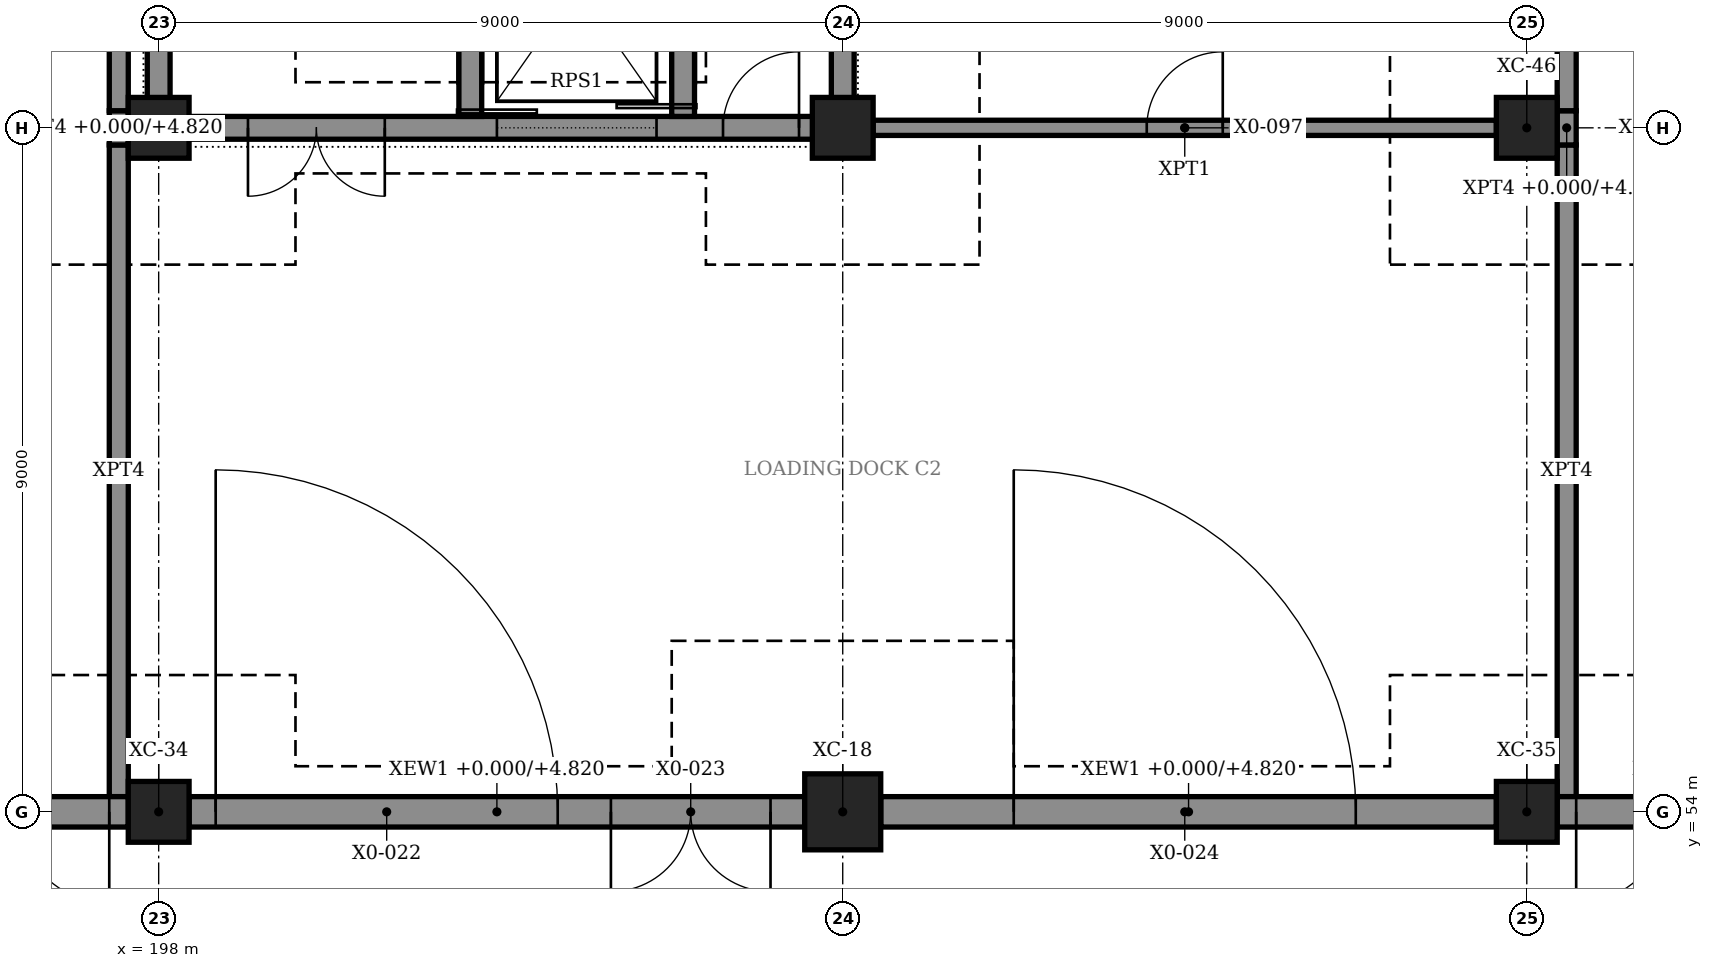
"""IFC4 building model, lengths in metres.
Left out: names, types, materials, properties, quantities, classifications, styles, units other than length and angle.
Written with IfcOpenShell. Run it as: python <this file> out.ifc"""

import sys

from ifc_helpers import new_model, si_unit, direction, frame, frame_2d, origin, origin_2d, place, context, subcontext, project, spatial, rectangle, hollow_rectangle, extrude, element, fill, save


model = new_model("IFC4")
c1 = context("Model", 3, precision=1e-05, world=origin(), true_north=direction((0.0, 1.0)))
c2 = subcontext(c1, "Body", "Model", "MODEL_VIEW")
j1 = project(units=[si_unit("LENGTHUNIT", "METRE"), si_unit("PLANEANGLEUNIT", "RADIAN")], contexts=[c1])
p1 = place(None, origin())
s1 = spatial("IfcSite", under=j1, at=p1, CompositionType="ELEMENT")
p2 = place(p1, origin())
s2 = spatial("IfcBuilding", under=s1, at=p2, CompositionType="ELEMENT")
p3 = place(p2, origin())
s3 = spatial("IfcBuildingStorey", under=s2, at=p3, CompositionType="ELEMENT", Elevation=0.0)
p4 = place(p3, frame((207.0, 54.0, 0.0), z_axis=(0.0, 0.0, 1.0), x_axis=(1.0, 0.0, 0.0)))
e1 = element("IfcColumn", 1, at=p4, inside=s3, PredefinedType="COLUMN", context=c2, shape_type="SweptSolid", body=[
    extrude(hollow_rectangle(XDim=1.0, YDim=1.0, WallThickness=0.032, at=origin_2d()), origin(), (0.0, 0.0, 1.0), 6.0),
])
for number, where, z_axis, x_axis in (
    (2, (198.0, 54.0, 0.0), (0.0, 0.0, 1.0), (1.0, 0.0, 0.0)),
    (3, (216.0, 54.0, 0.0), (0.0, 0.0, 1.0), (1.0, 0.0, 0.0)),
    (4, (198.0, 63.0, 0.0), (0.0, 0.0, 1.0), (1.0, 0.0, 0.0)),
    (5, (207.0, 63.0, 0.0), (0.0, 0.0, 1.0), (1.0, 0.0, 0.0)),
    (6, (216.0, 63.0, 0.0), (0.0, 0.0, 1.0), (1.0, 0.0, 0.0)),
):
    element("IfcColumn", number, at=place(p3, frame(where, z_axis=z_axis, x_axis=x_axis)), inside=s3, PredefinedType="COLUMN", context=c2, shape_type="SweptSolid", body=[
        extrude(rectangle(XDim=0.8, YDim=0.8, at=origin_2d()), origin(), (0.0, 0.0, 1.0), 6.0),
    ])
p5 = place(p3, frame((197.85, 63.0, 0.0), z_axis=(0.0, 0.0, 1.0), x_axis=(1.0, 0.0, 0.0)))
e7 = element("IfcWall", 7, at=p5, inside=s3, PredefinedType="SHEAR", context=c2, shape_type="SweptSolid", body=[
    extrude(rectangle(XDim=9.3, YDim=0.3, at=frame_2d((4.65, 0.0))), origin(), (0.0, 0.0, 1.0), 6.0),
])
p6 = place(p5, frame((1.325, 0.0, 0.0)))
e8 = element("IfcOpeningElement", 8, at=p6, cuts=e7, PredefinedType="OPENING", context=c2, shape_type="SweptSolid", body=[
    extrude(rectangle(XDim=1.8, YDim=2.4, at=frame_2d((0.9, 1.2))), frame((0.0, 0.16, 0.0), z_axis=(0.0, -1.0, 0.0), x_axis=(1.0, 0.0, 0.0)), (0.0, 0.0, 1.0), 0.32),
])
p7 = place(p5, frame((4.6, 0.0, 0.0)))
e9 = element("IfcOpeningElement", 9, at=p7, cuts=e7, PredefinedType="OPENING", context=c2, shape_type="SweptSolid", body=[
    extrude(rectangle(XDim=2.1, YDim=2.4, at=frame_2d((1.05, 1.2))), frame((0.0, 0.16, 0.0), z_axis=(0.0, -1.0, 0.0), x_axis=(1.0, 0.0, 0.0)), (0.0, 0.0, 1.0), 0.32),
])
p8 = place(p5, frame((7.575, 0.0, 0.0)))
e10 = element("IfcOpeningElement", 10, at=p8, cuts=e7, PredefinedType="OPENING", context=c2, shape_type="SweptSolid", body=[
    extrude(rectangle(XDim=1.0, YDim=2.4, at=frame_2d((0.5, 1.2))), frame((0.0, 0.16, 0.0), z_axis=(0.0, -1.0, 0.0), x_axis=(1.0, 0.0, 0.0)), (0.0, 0.0, 1.0), 0.32),
])
for number, where, z_axis, x_axis in (
    (11, (198.0, 63.15, 0.0), (0.0, 0.0, 1.0), (0.0, 1.0, 0.0)),
    (12, (207.0, 63.15, 0.0), (0.0, 0.0, 1.0), (0.0, 1.0, 0.0)),
):
    element("IfcWall", number, at=place(p3, frame(where, z_axis=z_axis, x_axis=x_axis)), inside=s3, PredefinedType="SHEAR", context=c2, shape_type="SweptSolid", body=[
        extrude(rectangle(XDim=8.65, YDim=0.3, at=frame_2d((4.325, 0.0))), origin(), (0.0, 0.0, 1.0), 6.0),
    ])
p9 = place(p3, frame((189.5, 54.0, 0.0), z_axis=(0.0, 0.0, 1.0), x_axis=(1.0, 0.0, 0.0)))
e13 = element("IfcWall", 13, at=p9, inside=s3, PredefinedType="SOLIDWALL", context=c2, shape_type="SweptSolid", body=[
    extrude(rectangle(XDim=8.1, YDim=0.4, at=frame_2d((4.05, 0.0))), origin(), (0.0, 0.0, 1.0), 4.82),
])
p10 = place(p9, frame((0.25, 0.0, 0.0)))
e14 = element("IfcOpeningElement", 14, at=p10, cuts=e13, PredefinedType="OPENING", context=c2, shape_type="SweptSolid", body=[
    extrude(rectangle(XDim=4.5, YDim=4.5, at=frame_2d((2.25, 2.25))), frame((0.0, 0.21, 0.0), z_axis=(0.0, -1.0, 0.0), x_axis=(1.0, 0.0, 0.0)), (0.0, 0.0, 1.0), 0.42),
])
p11 = place(p9, frame((5.45, 0.0, 0.0)))
e15 = element("IfcOpeningElement", 15, at=p11, cuts=e13, PredefinedType="OPENING", context=c2, shape_type="SweptSolid", body=[
    extrude(rectangle(XDim=2.4, YDim=2.4, at=frame_2d((1.2, 1.2))), frame((0.0, 0.21, 0.0), z_axis=(0.0, -1.0, 0.0), x_axis=(1.0, 0.0, 0.0)), (0.0, 0.0, 1.0), 0.42),
])
p12 = place(p3, frame((198.4, 54.0, 0.0), z_axis=(0.0, 0.0, 1.0), x_axis=(1.0, 0.0, 0.0)))
e16 = element("IfcWall", 16, at=p12, inside=s3, PredefinedType="SOLIDWALL", context=c2, shape_type="SweptSolid", body=[
    extrude(rectangle(XDim=8.1, YDim=0.4, at=frame_2d((4.05, 0.0))), origin(), (0.0, 0.0, 1.0), 4.82),
])
p13 = place(p12, frame((0.35, 0.0, 0.0)))
e17 = element("IfcOpeningElement", 17, at=p13, cuts=e16, PredefinedType="OPENING", context=c2, shape_type="SweptSolid", body=[
    extrude(rectangle(XDim=4.5, YDim=4.5, at=frame_2d((2.25, 2.25))), frame((0.0, 0.21, 0.0), z_axis=(0.0, -1.0, 0.0), x_axis=(1.0, 0.0, 0.0)), (0.0, 0.0, 1.0), 0.42),
])
p14 = place(p12, frame((5.55, 0.0, 0.0)))
e18 = element("IfcOpeningElement", 18, at=p14, cuts=e16, PredefinedType="OPENING", context=c2, shape_type="SweptSolid", body=[
    extrude(rectangle(XDim=2.1, YDim=2.4, at=frame_2d((1.05, 1.2))), frame((0.0, 0.21, 0.0), z_axis=(0.0, -1.0, 0.0), x_axis=(1.0, 0.0, 0.0)), (0.0, 0.0, 1.0), 0.42),
])
p15 = place(p3, frame((207.5, 54.0, 0.0), z_axis=(0.0, 0.0, 1.0), x_axis=(1.0, 0.0, 0.0)))
e19 = element("IfcWall", 19, at=p15, inside=s3, PredefinedType="SOLIDWALL", context=c2, shape_type="SweptSolid", body=[
    extrude(rectangle(XDim=8.1, YDim=0.4, at=frame_2d((4.05, 0.0))), origin(), (0.0, 0.0, 1.0), 4.82),
])
p16 = place(p15, frame((1.75, 0.0, 0.0)))
e20 = element("IfcOpeningElement", 20, at=p16, cuts=e19, PredefinedType="OPENING", context=c2, shape_type="SweptSolid", body=[
    extrude(rectangle(XDim=4.5, YDim=4.5, at=frame_2d((2.25, 2.25))), frame((0.0, 0.21, 0.0), z_axis=(0.0, -1.0, 0.0), x_axis=(1.0, 0.0, 0.0)), (0.0, 0.0, 1.0), 0.42),
])
p17 = place(p3, frame((216.4, 54.0, 0.0), z_axis=(0.0, 0.0, 1.0), x_axis=(1.0, 0.0, 0.0)))
e21 = element("IfcWall", 21, at=p17, inside=s3, PredefinedType="SOLIDWALL", context=c2, shape_type="SweptSolid", body=[
    extrude(rectangle(XDim=8.1, YDim=0.4, at=frame_2d((4.05, 0.0))), origin(), (0.0, 0.0, 1.0), 4.82),
])
p18 = place(p17, frame((3.35, 0.0, 0.0)))
e22 = element("IfcOpeningElement", 22, at=p18, cuts=e21, PredefinedType="OPENING", context=c2, shape_type="SweptSolid", body=[
    extrude(rectangle(XDim=4.5, YDim=4.5, at=frame_2d((2.25, 2.25))), frame((0.0, 0.21, 0.0), z_axis=(0.0, -1.0, 0.0), x_axis=(1.0, 0.0, 0.0)), (0.0, 0.0, 1.0), 0.42),
])
p19 = place(p17, frame((0.25, 0.0, 0.0)))
e23 = element("IfcOpeningElement", 23, at=p19, cuts=e21, PredefinedType="OPENING", context=c2, shape_type="SweptSolid", body=[
    extrude(rectangle(XDim=2.4, YDim=2.4, at=frame_2d((1.2, 1.2))), frame((0.0, 0.21, 0.0), z_axis=(0.0, -1.0, 0.0), x_axis=(1.0, 0.0, 0.0)), (0.0, 0.0, 1.0), 0.42),
])
p20 = place(p3, frame((202.1, 63.15, 0.0), z_axis=(0.0, 0.0, 1.0), x_axis=(0.0, 1.0, 0.0)))
e24 = element("IfcWall", 24, at=p20, inside=s3, PredefinedType="SHEAR", context=c2, shape_type="SweptSolid", body=[
    extrude(rectangle(XDim=8.65, YDim=0.3, at=frame_2d((4.325, 0.0))), origin(), (0.0, 0.0, 1.0), 5.72),
])
p21 = place(p3, frame((204.9, 63.15, 0.0), z_axis=(0.0, 0.0, 1.0), x_axis=(0.0, 1.0, 0.0)))
e25 = element("IfcWall", 25, at=p21, inside=s3, PredefinedType="SHEAR", context=c2, shape_type="SweptSolid", body=[
    extrude(rectangle(XDim=3.7, YDim=0.3, at=frame_2d((1.85, 0.0))), origin(), (0.0, 0.0, 1.0), 5.72),
])
for number, where, z_axis, x_axis in (
    (26, (202.1, 63.6, -1.4), (0.0, 0.0, 1.0), (0.0, 1.0, 0.0)),
    (27, (204.9, 63.6, -1.4), (0.0, 0.0, 1.0), (0.0, 1.0, 0.0)),
):
    element("IfcWall", number, at=place(p3, frame(where, z_axis=z_axis, x_axis=x_axis)), inside=s3, PredefinedType="SHEAR", context=c2, shape_type="SweptSolid", body=[
        extrude(rectangle(XDim=3.25, YDim=0.3, at=frame_2d((1.625, 0.0))), origin(), (0.0, 0.0, 1.0), 1.4),
    ])
p22 = place(p3, frame((207.4, 63.0, 0.0), z_axis=(0.0, 0.0, 1.0), x_axis=(1.0, 0.0, 0.0)))
e28 = element("IfcWall", 28, at=p22, inside=s3, PredefinedType="PARTITIONING", context=c2, shape_type="SweptSolid", body=[
    extrude(rectangle(XDim=8.2, YDim=0.2, at=frame_2d((4.1, 0.0))), origin(), (0.0, 0.0, 1.0), 4.82),
])
p23 = place(p22, frame((3.6, 0.0, 0.015)))
e29 = element("IfcOpeningElement", 29, at=p23, cuts=e28, PredefinedType="OPENING", context=c2, shape_type="SweptSolid", body=[
    extrude(rectangle(XDim=1.0, YDim=2.4, at=frame_2d((0.5, 1.2))), frame((0.0, 0.11, 0.0), z_axis=(0.0, -1.0, 0.0), x_axis=(1.0, 0.0, 0.0)), (0.0, 0.0, 1.0), 0.22),
])
p24 = place(p3, frame((197.475, 54.2, 0.0), z_axis=(0.0, 0.0, 1.0), x_axis=(0.0, 1.0, 0.0)))
e30 = element("IfcWall", 30, at=p24, inside=s3, PredefinedType="PARTITIONING", context=c2, shape_type="SweptSolid", body=[
    extrude(rectangle(XDim=8.575, YDim=0.25, at=frame_2d((4.288, 0.0))), origin(), (0.0, 0.0, 1.0), 5.72),
])
p25 = place(p3, frame((197.475, 62.775, 0.0), z_axis=(0.0, 0.0, 1.0), x_axis=(0.0, 1.0, 0.0)))
e31 = element("IfcWall", 31, at=p25, inside=s3, PredefinedType="PARTITIONING", context=c2, shape_type="SweptSolid", body=[
    extrude(rectangle(XDim=0.45, YDim=0.25, at=frame_2d((0.225, 0.0))), origin(), (0.0, 0.0, 1.0), 4.82),
])
for number, where, z_axis, x_axis in (
    (32, (197.475, 63.225, 0.0), (0.0, 0.0, 1.0), (0.0, 1.0, 0.0)),
    (33, (216.525, 54.2, 0.0), (0.0, 0.0, 1.0), (0.0, 1.0, 0.0)),
):
    element("IfcWall", number, at=place(p3, frame(where, z_axis=z_axis, x_axis=x_axis)), inside=s3, PredefinedType="PARTITIONING", context=c2, shape_type="SweptSolid", body=[
        extrude(rectangle(XDim=8.575, YDim=0.25, at=frame_2d((4.288, 0.0))), origin(), (0.0, 0.0, 1.0), 5.72),
    ])
p26 = place(p3, frame((216.525, 62.775, 0.0), z_axis=(0.0, 0.0, 1.0), x_axis=(0.0, 1.0, 0.0)))
e34 = element("IfcWall", 34, at=p26, inside=s3, PredefinedType="PARTITIONING", context=c2, shape_type="SweptSolid", body=[
    extrude(rectangle(XDim=0.45, YDim=0.25, at=frame_2d((0.225, 0.0))), origin(), (0.0, 0.0, 1.0), 4.82),
])
p27 = place(p3, frame((216.525, 63.225, 0.0), z_axis=(0.0, 0.0, 1.0), x_axis=(0.0, 1.0, 0.0)))
e35 = element("IfcWall", 35, at=p27, inside=s3, PredefinedType="PARTITIONING", context=c2, shape_type="SweptSolid", body=[
    extrude(rectangle(XDim=8.575, YDim=0.25, at=frame_2d((4.288, 0.0))), origin(), (0.0, 0.0, 1.0), 5.72),
])
p28 = place(p13, origin())
e36 = element("IfcDoor", 36, at=p28, inside=s3, OperationType="ROLLINGUP", PredefinedType="DOOR", context=c2, shape_type="SweptSolid", body=[
    extrude(rectangle(XDim=4.5, YDim=4.5, at=frame_2d((2.25, 2.25))), frame((0.0, 0.025, 0.0), z_axis=(0.0, -1.0, 0.0), x_axis=(1.0, 0.0, 0.0)), (0.0, 0.0, 1.0), 0.05),
])
fill(e17, e36)
p29 = place(p14, frame((2.1, 0.0, 0.0), z_axis=(0.0, 0.0, 1.0), x_axis=(-1.0, 0.0, 0.0)))
e37 = element("IfcDoor", 37, at=p29, inside=s3, OperationType="DOUBLE_DOOR_SINGLE_SWING", PredefinedType="DOOR", context=c2, shape_type="SweptSolid", body=[
    extrude(rectangle(XDim=2.1, YDim=2.4, at=frame_2d((1.05, 1.2))), frame((0.0, 0.025, 0.0), z_axis=(0.0, -1.0, 0.0), x_axis=(1.0, 0.0, 0.0)), (0.0, 0.0, 1.0), 0.05),
])
fill(e18, e37)
p30 = place(p16, origin())
e38 = element("IfcDoor", 38, at=p30, inside=s3, OperationType="ROLLINGUP", PredefinedType="DOOR", context=c2, shape_type="SweptSolid", body=[
    extrude(rectangle(XDim=4.5, YDim=4.5, at=frame_2d((2.25, 2.25))), frame((0.0, 0.025, 0.0), z_axis=(0.0, -1.0, 0.0), x_axis=(1.0, 0.0, 0.0)), (0.0, 0.0, 1.0), 0.05),
])
fill(e20, e38)
p31 = place(p11, frame((2.4, 0.0, 0.0), z_axis=(0.0, 0.0, 1.0), x_axis=(-1.0, 0.0, 0.0)))
e39 = element("IfcDoor", 39, at=p31, inside=s3, OperationType="DOUBLE_DOOR_SINGLE_SWING", PredefinedType="DOOR", context=c2, shape_type="SweptSolid", body=[
    extrude(rectangle(XDim=2.4, YDim=2.4, at=frame_2d((1.2, 1.2))), frame((0.0, 0.025, 0.0), z_axis=(0.0, -1.0, 0.0), x_axis=(1.0, 0.0, 0.0)), (0.0, 0.0, 1.0), 0.05),
])
fill(e15, e39)
p32 = place(p19, frame((2.4, 0.0, 0.0), z_axis=(0.0, 0.0, 1.0), x_axis=(-1.0, 0.0, 0.0)))
e40 = element("IfcDoor", 40, at=p32, inside=s3, OperationType="DOUBLE_DOOR_SINGLE_SWING", PredefinedType="DOOR", context=c2, shape_type="SweptSolid", body=[
    extrude(rectangle(XDim=2.4, YDim=2.4, at=frame_2d((1.2, 1.2))), frame((0.0, 0.025, 0.0), z_axis=(0.0, -1.0, 0.0), x_axis=(1.0, 0.0, 0.0)), (0.0, 0.0, 1.0), 0.05),
])
fill(e23, e40)
p33 = place(p23, origin())
e41 = element("IfcDoor", 41, at=p33, inside=s3, OperationType="SINGLE_SWING_RIGHT", PredefinedType="DOOR", context=c2, shape_type="SweptSolid", body=[
    extrude(rectangle(XDim=1.0, YDim=2.4, at=frame_2d((0.5, 1.2))), frame((0.0, 0.025, 0.0), z_axis=(0.0, -1.0, 0.0), x_axis=(1.0, 0.0, 0.0)), (0.0, 0.0, 1.0), 0.05),
])
fill(e29, e41)
p34 = place(p6, frame((1.8, 0.0, 0.0), z_axis=(0.0, 0.0, 1.0), x_axis=(-1.0, 0.0, 0.0)))
e42 = element("IfcDoor", 42, at=p34, inside=s3, OperationType="DOUBLE_DOOR_SINGLE_SWING", PredefinedType="DOOR", context=c2, shape_type="SweptSolid", body=[
    extrude(rectangle(XDim=1.8, YDim=2.4, at=frame_2d((0.9, 1.2))), frame((0.0, 0.025, 0.0), z_axis=(0.0, -1.0, 0.0), x_axis=(1.0, 0.0, 0.0)), (0.0, 0.0, 1.0), 0.05),
])
fill(e8, e42)
p35 = place(p7, origin())
e43 = element("IfcDoor", 43, at=p35, inside=s3, OperationType="DOUBLE_DOOR_SLIDING", PredefinedType="DOOR", context=c2, shape_type="SweptSolid", body=[
    extrude(rectangle(XDim=2.1, YDim=2.4, at=frame_2d((1.05, 1.2))), frame((0.0, 0.025, 0.0), z_axis=(0.0, -1.0, 0.0), x_axis=(1.0, 0.0, 0.0)), (0.0, 0.0, 1.0), 0.05),
])
fill(e9, e43)
p36 = place(p8, origin())
e44 = element("IfcDoor", 44, at=p36, inside=s3, OperationType="SINGLE_SWING_RIGHT", PredefinedType="DOOR", context=c2, shape_type="SweptSolid", body=[
    extrude(rectangle(XDim=1.0, YDim=2.4, at=frame_2d((0.5, 1.2))), frame((0.0, 0.025, 0.0), z_axis=(0.0, -1.0, 0.0), x_axis=(1.0, 0.0, 0.0)), (0.0, 0.0, 1.0), 0.05),
])
fill(e10, e44)
save(model, sys.argv[1])
